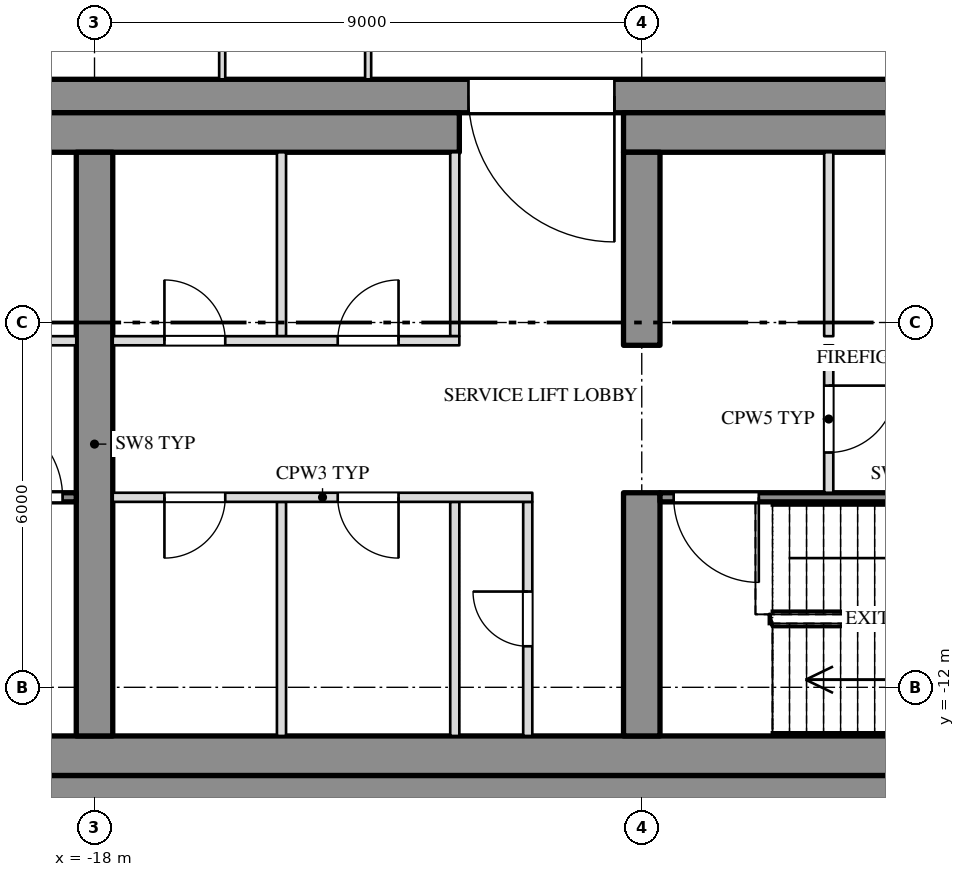
"""IFC4 building model, lengths in metres.
Left out: names, types, materials, properties, quantities, classifications, styles, units other than length and angle.
Written with IfcOpenShell. Run it as: python <this file> out.ifc"""

import sys

from ifc_helpers import new_model, si_unit, direction, frame, frame_2d, origin, place, context, subcontext, project, spatial, rectangle, extrude, element, fill, save


model = new_model("IFC4")
c1 = context("Model", 3, precision=1e-05, world=origin(), true_north=direction((0.0, 1.0)))
c2 = subcontext(c1, "Body", "Model", "MODEL_VIEW")
j1 = project(units=[si_unit("LENGTHUNIT", "METRE"), si_unit("PLANEANGLEUNIT", "RADIAN")], contexts=[c1])
p1 = place(None, origin())
s1 = spatial("IfcSite", under=j1, at=p1, CompositionType="ELEMENT")
p2 = place(p1, origin())
s2 = spatial("IfcBuilding", under=s1, at=p2, CompositionType="ELEMENT")
p3 = place(p2, frame((0.0, 0.0, 276.5)))
s3 = spatial("IfcBuildingStorey", under=s2, at=p3, CompositionType="ELEMENT", Elevation=276.5)
p4 = place(p3, frame((-27.0, -2.275, 0.0), z_axis=(0.0, 0.0, 1.0), x_axis=(1.0, 0.0, 0.0)))
e1 = element("IfcWall", 1, at=p4, inside=s3, PredefinedType="SHEAR", context=c2, shape_type="SweptSolid", body=[
    extrude(rectangle(XDim=54.0, YDim=0.55, at=frame_2d((27.0, 0.0))), origin(), (0.0, 0.0, 1.0), 3.78),
])
p5 = place(p4, frame((15.15, 0.0, 0.0)))
e2 = element("IfcOpeningElement", 2, at=p5, cuts=e1, PredefinedType="OPENING", context=c2, shape_type="SweptSolid", body=[
    extrude(rectangle(XDim=2.4, YDim=2.1, at=frame_2d((1.2, 1.05))), frame((0.0, 0.287, 0.0), z_axis=(0.0, -1.0, 0.0), x_axis=(1.0, 0.0, 0.0)), (0.0, 0.0, 1.0), 0.574),
])
p6 = place(p4, frame((36.45, 0.0, 0.0)))
e3 = element("IfcOpeningElement", 3, at=p6, cuts=e1, PredefinedType="OPENING", context=c2, shape_type="SweptSolid", body=[
    extrude(rectangle(XDim=2.4, YDim=2.1, at=frame_2d((1.2, 1.05))), frame((0.0, 0.287, 0.0), z_axis=(0.0, -1.0, 0.0), x_axis=(1.0, 0.0, 0.0)), (0.0, 0.0, 1.0), 0.574),
])
p7 = place(p3, frame((-27.0, -13.725, 0.0), z_axis=(0.0, 0.0, 1.0), x_axis=(1.0, 0.0, 0.0)))
e4 = element("IfcWall", 4, at=p7, inside=s3, PredefinedType="SHEAR", context=c2, shape_type="SweptSolid", body=[
    extrude(rectangle(XDim=54.0, YDim=0.55, at=frame_2d((27.0, 0.0))), origin(), (0.0, 0.0, 1.0), 3.78),
])
p8 = place(p3, frame((-26.45, -2.875, 0.0), z_axis=(0.0, 0.0, 1.0), x_axis=(1.0, 0.0, 0.0)))
e5 = element("IfcWall", 5, at=p8, inside=s3, PredefinedType="SHEAR", context=c2, shape_type="SweptSolid", body=[
    extrude(rectangle(XDim=14.45, YDim=0.65, at=frame_2d((7.225, 0.0))), origin(), (0.0, 0.0, 1.0), 3.78),
])
p9 = place(p3, frame((-9.3, -2.875, 0.0), z_axis=(0.0, 0.0, 1.0), x_axis=(1.0, 0.0, 0.0)))
e6 = element("IfcWall", 6, at=p9, inside=s3, PredefinedType="SHEAR", context=c2, shape_type="SweptSolid", body=[
    extrude(rectangle(XDim=18.6, YDim=0.65, at=frame_2d((9.3, 0.0))), origin(), (0.0, 0.0, 1.0), 3.78),
])
p10 = place(p3, frame((-26.45, -13.125, 0.0), z_axis=(0.0, 0.0, 1.0), x_axis=(1.0, 0.0, 0.0)))
e7 = element("IfcWall", 7, at=p10, inside=s3, PredefinedType="SHEAR", context=c2, shape_type="SweptSolid", body=[
    extrude(rectangle(XDim=52.9, YDim=0.65, at=frame_2d((26.45, 0.0))), origin(), (0.0, 0.0, 1.0), 3.78),
])
p11 = place(p3, frame((-18.0, -12.8, 0.0), z_axis=(0.0, 0.0, 1.0), x_axis=(0.0, 1.0, 0.0)))
e8 = element("IfcWall", 8, at=p11, inside=s3, PredefinedType="SHEAR", context=c2, shape_type="SweptSolid", body=[
    extrude(rectangle(XDim=9.6, YDim=0.6, at=frame_2d((4.8, 0.0))), origin(), (0.0, 0.0, 1.0), 3.78),
])
p12 = place(p3, frame((-9.0, -12.8, 0.0), z_axis=(0.0, 0.0, 1.0), x_axis=(0.0, 1.0, 0.0)))
e9 = element("IfcWall", 9, at=p12, inside=s3, PredefinedType="SHEAR", context=c2, shape_type="SweptSolid", body=[
    extrude(rectangle(XDim=4.0, YDim=0.6, at=frame_2d((2.0, 0.0))), origin(), (0.0, 0.0, 1.0), 3.78),
])
p13 = place(p3, frame((-9.0, -6.375, 0.0), z_axis=(0.0, 0.0, 1.0), x_axis=(0.0, 1.0, 0.0)))
e10 = element("IfcWall", 10, at=p13, inside=s3, PredefinedType="SHEAR", context=c2, shape_type="SweptSolid", body=[
    extrude(rectangle(XDim=3.175, YDim=0.6, at=frame_2d((1.587, 0.0))), origin(), (0.0, 0.0, 1.0), 3.78),
])
p14 = place(p3, frame((-15.9, -2.0, 0.0), z_axis=(0.0, 0.0, 1.0), x_axis=(0.0, 1.0, 0.0)))
e11 = element("IfcWall", 11, at=p14, inside=s3, PredefinedType="PARTITIONING", context=c2, shape_type="SweptSolid", body=[
    extrude(rectangle(XDim=3.55, YDim=0.1, at=frame_2d((1.775, 0.0))), origin(), (0.0, 0.0, 1.0), 3.78),
])
p15 = place(p3, frame((-13.5, -2.0, 0.0), z_axis=(0.0, 0.0, 1.0), x_axis=(0.0, 1.0, 0.0)))
e12 = element("IfcWall", 12, at=p15, inside=s3, PredefinedType="PARTITIONING", context=c2, shape_type="SweptSolid", body=[
    extrude(rectangle(XDim=5.95, YDim=0.1, at=frame_2d((2.975, 0.0))), origin(), (0.0, 0.0, 1.0), 3.247),
])
for number, where, z_axis, x_axis in (
    (13, (-12.075, -6.225, 0.0), (0.0, 0.0, 1.0), (0.0, 1.0, 0.0)),
    (14, (-14.925, -6.225, 0.0), (0.0, 0.0, 1.0), (0.0, 1.0, 0.0)),
    (15, (-5.925, -6.225, 0.0), (0.0, 0.0, 1.0), (0.0, 1.0, 0.0)),
):
    element("IfcWall", number, at=place(p3, frame(where, z_axis=z_axis, x_axis=x_axis)), inside=s3, PredefinedType="PARTITIONING", context=c2, shape_type="SweptSolid", body=[
        extrude(rectangle(XDim=3.025, YDim=0.15, at=frame_2d((1.513, 0.0))), origin(), (0.0, 0.0, 1.0), 3.78),
    ])
p16 = place(p3, frame((-10.875, -12.8, 0.0), z_axis=(0.0, 0.0, 1.0), x_axis=(0.0, 1.0, 0.0)))
e16 = element("IfcWall", 16, at=p16, inside=s3, PredefinedType="PARTITIONING", context=c2, shape_type="SweptSolid", body=[
    extrude(rectangle(XDim=3.85, YDim=0.15, at=frame_2d((1.925, 0.0))), origin(), (0.0, 0.0, 1.0), 3.78),
])
p17 = place(p16, frame((1.475, 0.0, 0.0)))
e17 = element("IfcOpeningElement", 17, at=p17, cuts=e16, PredefinedType="OPENING", context=c2, shape_type="SweptSolid", body=[
    extrude(rectangle(XDim=0.9, YDim=2.1, at=frame_2d((0.45, 1.05))), frame((0.0, 0.087, 0.0), z_axis=(0.0, -1.0, 0.0), x_axis=(1.0, 0.0, 0.0)), (0.0, 0.0, 1.0), 0.174),
])
for number, where, z_axis, x_axis in (
    (18, (-12.075, -12.8, 0.0), (0.0, 0.0, 1.0), (0.0, 1.0, 0.0)),
    (19, (-14.925, -12.8, 0.0), (0.0, 0.0, 1.0), (0.0, 1.0, 0.0)),
):
    element("IfcWall", number, at=place(p3, frame(where, z_axis=z_axis, x_axis=x_axis)), inside=s3, PredefinedType="PARTITIONING", context=c2, shape_type="SweptSolid", body=[
        extrude(rectangle(XDim=3.85, YDim=0.15, at=frame_2d((1.925, 0.0))), origin(), (0.0, 0.0, 1.0), 3.78),
    ])
p18 = place(p3, frame((-5.925, -8.8, 0.0), z_axis=(0.0, 0.0, 1.0), x_axis=(0.0, 1.0, 0.0)))
e20 = element("IfcWall", 20, at=p18, inside=s3, PredefinedType="PARTITIONING", context=c2, shape_type="SweptSolid", body=[
    extrude(rectangle(XDim=2.425, YDim=0.15, at=frame_2d((1.212, 0.0))), origin(), (0.0, 0.0, 1.0), 3.78),
])
p19 = place(p18, frame((0.662, 0.0, 0.0)))
e21 = element("IfcOpeningElement", 21, at=p19, cuts=e20, PredefinedType="OPENING", context=c2, shape_type="SweptSolid", body=[
    extrude(rectangle(XDim=1.1, YDim=2.1, at=frame_2d((0.55, 1.05))), frame((0.0, 0.087, 0.0), z_axis=(0.0, -1.0, 0.0), x_axis=(1.0, 0.0, 0.0)), (0.0, 0.0, 1.0), 0.174),
])
p20 = place(p3, frame((-23.4, -6.3, 0.0), z_axis=(0.0, 0.0, 1.0), x_axis=(1.0, 0.0, 0.0)))
e22 = element("IfcWall", 22, at=p20, inside=s3, PredefinedType="PARTITIONING", context=c2, shape_type="SweptSolid", body=[
    extrude(rectangle(XDim=5.1, YDim=0.15, at=frame_2d((2.55, 0.0))), origin(), (0.0, 0.0, 1.0), 3.78),
])
p21 = place(p20, frame((0.65, 0.0, 0.0)))
e23 = element("IfcOpeningElement", 23, at=p21, cuts=e22, PredefinedType="OPENING", context=c2, shape_type="SweptSolid", body=[
    extrude(rectangle(XDim=1.4, YDim=2.1, at=frame_2d((0.7, 1.05))), frame((0.0, 0.087, 0.0), z_axis=(0.0, -1.0, 0.0), x_axis=(1.0, 0.0, 0.0)), (0.0, 0.0, 1.0), 0.174),
])
p22 = place(p20, frame((3.35, 0.0, 0.0)))
e24 = element("IfcOpeningElement", 24, at=p22, cuts=e22, PredefinedType="OPENING", context=c2, shape_type="SweptSolid", body=[
    extrude(rectangle(XDim=1.1, YDim=2.1, at=frame_2d((0.55, 1.05))), frame((0.0, 0.087, 0.0), z_axis=(0.0, -1.0, 0.0), x_axis=(1.0, 0.0, 0.0)), (0.0, 0.0, 1.0), 0.174),
])
p23 = place(p3, frame((-17.7, -6.3, 0.0), z_axis=(0.0, 0.0, 1.0), x_axis=(1.0, 0.0, 0.0)))
e25 = element("IfcWall", 25, at=p23, inside=s3, PredefinedType="PARTITIONING", context=c2, shape_type="SweptSolid", body=[
    extrude(rectangle(XDim=5.7, YDim=0.15, at=frame_2d((2.85, 0.0))), origin(), (0.0, 0.0, 1.0), 3.78),
])
p24 = place(p23, frame((0.85, 0.0, 0.0)))
e26 = element("IfcOpeningElement", 26, at=p24, cuts=e25, PredefinedType="OPENING", context=c2, shape_type="SweptSolid", body=[
    extrude(rectangle(XDim=1.0, YDim=2.1, at=frame_2d((0.5, 1.05))), frame((0.0, 0.087, 0.0), z_axis=(0.0, -1.0, 0.0), x_axis=(1.0, 0.0, 0.0)), (0.0, 0.0, 1.0), 0.174),
])
p25 = place(p23, frame((3.7, 0.0, 0.0)))
e27 = element("IfcOpeningElement", 27, at=p25, cuts=e25, PredefinedType="OPENING", context=c2, shape_type="SweptSolid", body=[
    extrude(rectangle(XDim=1.0, YDim=2.1, at=frame_2d((0.5, 1.05))), frame((0.0, 0.087, 0.0), z_axis=(0.0, -1.0, 0.0), x_axis=(1.0, 0.0, 0.0)), (0.0, 0.0, 1.0), 0.174),
])
p26 = place(p3, frame((-25.8, -8.875, 0.0), z_axis=(0.0, 0.0, 1.0), x_axis=(1.0, 0.0, 0.0)))
e28 = element("IfcWall", 28, at=p26, inside=s3, PredefinedType="SHEAR", context=c2, shape_type="SweptSolid", body=[
    extrude(rectangle(XDim=7.5, YDim=0.15, at=frame_2d((3.75, 0.0))), origin(), (0.0, 0.0, 1.0), 3.78),
])
p27 = place(p26, frame((5.875, 0.0, 0.0)))
e29 = element("IfcOpeningElement", 29, at=p27, cuts=e28, PredefinedType="OPENING", context=c2, shape_type="SweptSolid", body=[
    extrude(rectangle(XDim=1.4, YDim=2.1, at=frame_2d((0.7, 1.05))), frame((0.0, 0.087, 0.0), z_axis=(0.0, -1.0, 0.0), x_axis=(1.0, 0.0, 0.0)), (0.0, 0.0, 1.0), 0.174),
])
p28 = place(p3, frame((-17.7, -8.875, 0.0), z_axis=(0.0, 0.0, 1.0), x_axis=(1.0, 0.0, 0.0)))
e30 = element("IfcWall", 30, at=p28, inside=s3, PredefinedType="PARTITIONING", context=c2, shape_type="SweptSolid", body=[
    extrude(rectangle(XDim=6.9, YDim=0.15, at=frame_2d((3.45, 0.0))), origin(), (0.0, 0.0, 1.0), 3.78),
])
p29 = place(p28, frame((0.85, 0.0, 0.0)))
e31 = element("IfcOpeningElement", 31, at=p29, cuts=e30, PredefinedType="OPENING", context=c2, shape_type="SweptSolid", body=[
    extrude(rectangle(XDim=1.0, YDim=2.1, at=frame_2d((0.5, 1.05))), frame((0.0, 0.087, 0.0), z_axis=(0.0, -1.0, 0.0), x_axis=(1.0, 0.0, 0.0)), (0.0, 0.0, 1.0), 0.174),
])
p30 = place(p28, frame((3.7, 0.0, 0.0)))
e32 = element("IfcOpeningElement", 32, at=p30, cuts=e30, PredefinedType="OPENING", context=c2, shape_type="SweptSolid", body=[
    extrude(rectangle(XDim=1.0, YDim=2.1, at=frame_2d((0.5, 1.05))), frame((0.0, 0.087, 0.0), z_axis=(0.0, -1.0, 0.0), x_axis=(1.0, 0.0, 0.0)), (0.0, 0.0, 1.0), 0.174),
])
p31 = place(p3, frame((-8.7, -8.875, 0.0), z_axis=(0.0, 0.0, 1.0), x_axis=(1.0, 0.0, 0.0)))
e33 = element("IfcWall", 33, at=p31, inside=s3, PredefinedType="SHEAR", context=c2, shape_type="SweptSolid", body=[
    extrude(rectangle(XDim=8.4, YDim=0.15, at=frame_2d((4.2, 0.0))), origin(), (0.0, 0.0, 1.0), 3.78),
])
p32 = place(p31, frame((0.225, 0.0, 0.0)))
e34 = element("IfcOpeningElement", 34, at=p32, cuts=e33, PredefinedType="OPENING", context=c2, shape_type="SweptSolid", body=[
    extrude(rectangle(XDim=1.4, YDim=2.1, at=frame_2d((0.7, 1.05))), frame((0.0, 0.087, 0.0), z_axis=(0.0, -1.0, 0.0), x_axis=(1.0, 0.0, 0.0)), (0.0, 0.0, 1.0), 0.174),
])
p33 = place(p27, origin())
e35 = element("IfcDoor", 35, at=p33, inside=s3, OperationType="DOUBLE_DOOR_SINGLE_SWING", PredefinedType="DOOR", context=c2, shape_type="SweptSolid", body=[
    extrude(rectangle(XDim=1.4, YDim=2.1, at=frame_2d((0.7, 1.05))), frame((0.0, 0.025, 0.0), z_axis=(0.0, -1.0, 0.0), x_axis=(1.0, 0.0, 0.0)), (0.0, 0.0, 1.0), 0.05),
])
fill(e29, e35)
p34 = place(p29, origin())
e36 = element("IfcDoor", 36, at=p34, inside=s3, OperationType="SINGLE_SWING_RIGHT", PredefinedType="DOOR", context=c2, shape_type="SweptSolid", body=[
    extrude(rectangle(XDim=1.0, YDim=2.1, at=frame_2d((0.5, 1.05))), frame((0.0, 0.025, 0.0), z_axis=(0.0, -1.0, 0.0), x_axis=(1.0, 0.0, 0.0)), (0.0, 0.0, 1.0), 0.05),
])
fill(e31, e36)
p35 = place(p24, origin())
e37 = element("IfcDoor", 37, at=p35, inside=s3, OperationType="SINGLE_SWING_LEFT", PredefinedType="DOOR", context=c2, shape_type="SweptSolid", body=[
    extrude(rectangle(XDim=1.0, YDim=2.1, at=frame_2d((0.5, 1.05))), frame((0.0, 0.025, 0.0), z_axis=(0.0, -1.0, 0.0), x_axis=(1.0, 0.0, 0.0)), (0.0, 0.0, 1.0), 0.05),
])
fill(e26, e37)
p36 = place(p30, origin())
e38 = element("IfcDoor", 38, at=p36, inside=s3, OperationType="SINGLE_SWING_LEFT", PredefinedType="DOOR", context=c2, shape_type="SweptSolid", body=[
    extrude(rectangle(XDim=1.0, YDim=2.1, at=frame_2d((0.5, 1.05))), frame((0.0, 0.025, 0.0), z_axis=(0.0, -1.0, 0.0), x_axis=(1.0, 0.0, 0.0)), (0.0, 0.0, 1.0), 0.05),
])
fill(e32, e38)
p37 = place(p25, origin())
e39 = element("IfcDoor", 39, at=p37, inside=s3, OperationType="SINGLE_SWING_RIGHT", PredefinedType="DOOR", context=c2, shape_type="SweptSolid", body=[
    extrude(rectangle(XDim=1.0, YDim=2.1, at=frame_2d((0.5, 1.05))), frame((0.0, 0.025, 0.0), z_axis=(0.0, -1.0, 0.0), x_axis=(1.0, 0.0, 0.0)), (0.0, 0.0, 1.0), 0.05),
])
fill(e27, e39)
p38 = place(p17, origin())
e40 = element("IfcDoor", 40, at=p38, inside=s3, OperationType="SINGLE_SWING_RIGHT", PredefinedType="DOOR", context=c2, shape_type="SweptSolid", body=[
    extrude(rectangle(XDim=0.9, YDim=2.1, at=frame_2d((0.45, 1.05))), frame((0.0, 0.025, 0.0), z_axis=(0.0, -1.0, 0.0), x_axis=(1.0, 0.0, 0.0)), (0.0, 0.0, 1.0), 0.05),
])
fill(e17, e40)
p39 = place(p5, origin())
e41 = element("IfcDoor", 41, at=p39, inside=s3, OperationType="DOUBLE_DOOR_SINGLE_SWING", PredefinedType="DOOR", context=c2, shape_type="SweptSolid", body=[
    extrude(rectangle(XDim=2.4, YDim=2.1, at=frame_2d((1.2, 1.05))), frame((0.0, 0.025, 0.0), z_axis=(0.0, -1.0, 0.0), x_axis=(1.0, 0.0, 0.0)), (0.0, 0.0, 1.0), 0.05),
])
fill(e2, e41)
p40 = place(p32, origin())
e42 = element("IfcDoor", 42, at=p40, inside=s3, OperationType="DOUBLE_DOOR_SINGLE_SWING", PredefinedType="DOOR", context=c2, shape_type="SweptSolid", body=[
    extrude(rectangle(XDim=1.4, YDim=2.1, at=frame_2d((0.7, 1.05))), frame((0.0, 0.025, 0.0), z_axis=(0.0, -1.0, 0.0), x_axis=(1.0, 0.0, 0.0)), (0.0, 0.0, 1.0), 0.05),
])
fill(e34, e42)
p41 = place(p19, origin())
e43 = element("IfcDoor", 43, at=p41, inside=s3, OperationType="SINGLE_SWING_LEFT", PredefinedType="DOOR", context=c2, shape_type="SweptSolid", body=[
    extrude(rectangle(XDim=1.1, YDim=2.1, at=frame_2d((0.55, 1.05))), frame((0.0, 0.025, 0.0), z_axis=(0.0, -1.0, 0.0), x_axis=(1.0, 0.0, 0.0)), (0.0, 0.0, 1.0), 0.05),
])
fill(e21, e43)
save(model, sys.argv[1])
